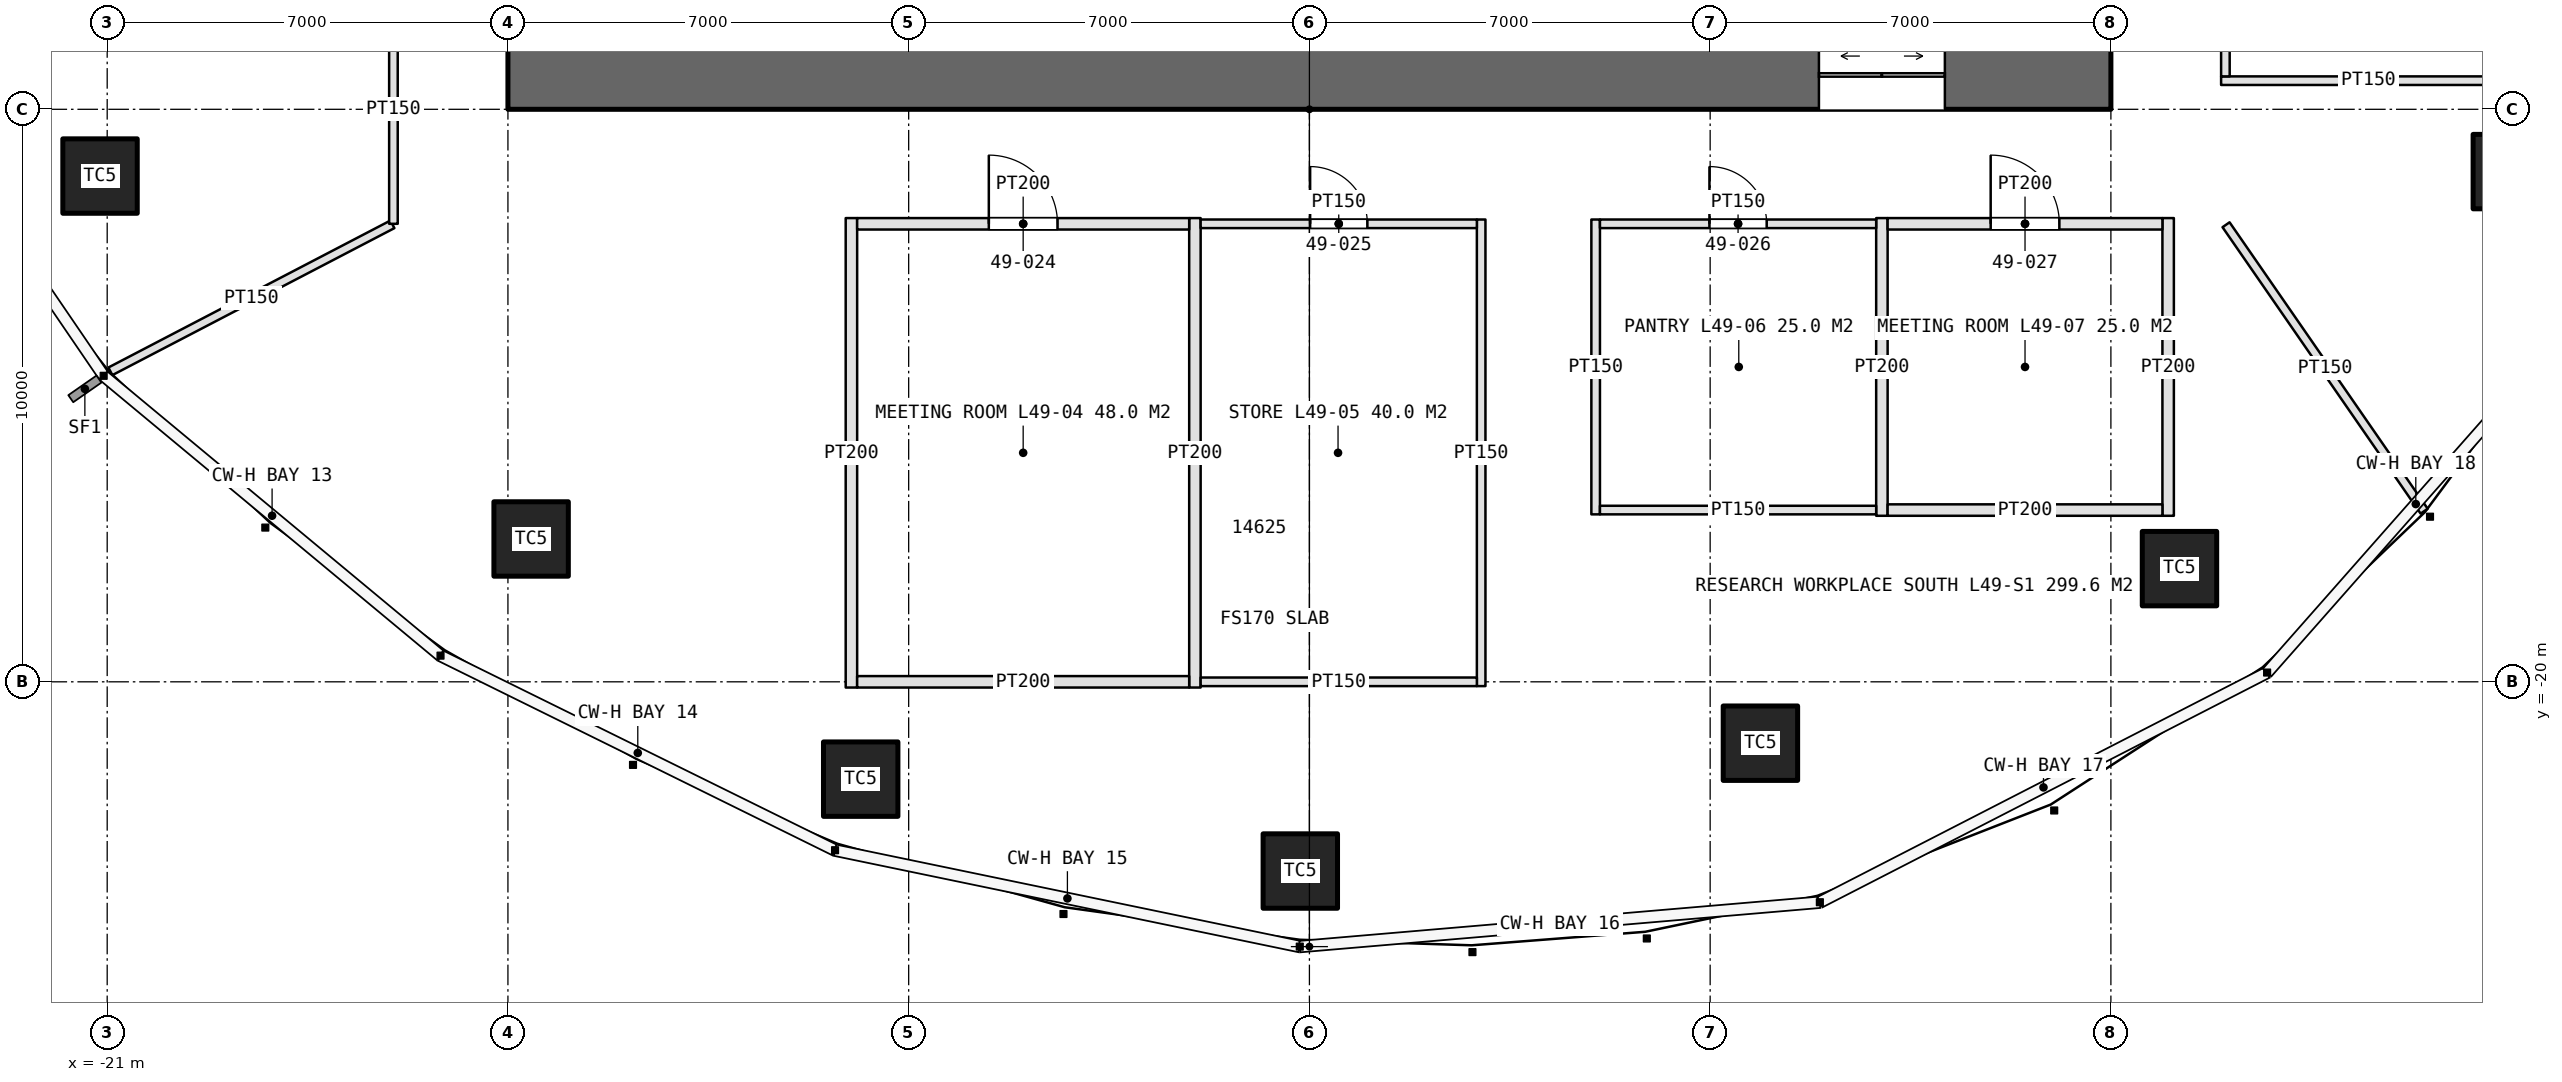
"""IFC4 building model, lengths in metres.
Left out: names, types, materials, properties, quantities, classifications, styles, units other than length and angle.
Written with IfcOpenShell. Run it as: python <this file> out.ifc"""

import sys

from ifc_helpers import new_model, si_unit, direction, frame, frame_2d, origin, origin_2d, place, context, subcontext, project, spatial, rectangle, extrude, element, fill, save


model = new_model("IFC4")
c1 = context("Model", 3, precision=1e-05, world=origin(), true_north=direction((0.0, 1.0)))
c2 = subcontext(c1, "Body", "Model", "MODEL_VIEW")
j1 = project(units=[si_unit("LENGTHUNIT", "METRE"), si_unit("PLANEANGLEUNIT", "RADIAN")], contexts=[c1])
p1 = place(None, origin())
s1 = spatial("IfcSite", under=j1, at=p1, CompositionType="ELEMENT")
p2 = place(p1, origin())
s2 = spatial("IfcBuilding", under=s1, at=p2, CompositionType="ELEMENT")
p3 = place(p2, frame((0.0, 0.0, 224.2)))
s3 = spatial("IfcBuildingStorey", under=s2, at=p3, CompositionType="ELEMENT", Elevation=224.2)
p4 = place(p3, frame((-14.0, -9.4, 0.0), z_axis=(0.0, 0.0, 1.0), x_axis=(1.0, 0.0, 0.0)))
e1 = element("IfcWall", 1, at=p4, inside=s3, PredefinedType="SHEAR", context=c2, shape_type="SweptSolid", body=[
    extrude(rectangle(XDim=28.0, YDim=1.2, at=frame_2d((14.0, 0.0))), origin(), (0.0, 0.0, 1.0), 4.2),
])
p5 = place(p4, frame((22.9, 0.0, 0.0)))
e2 = element("IfcOpeningElement", 2, at=p5, cuts=e1, PredefinedType="OPENING", context=c2, shape_type="SweptSolid", body=[
    extrude(rectangle(XDim=2.2, YDim=2.7, at=frame_2d((1.1, 1.35))), frame((0.0, 0.61, 0.0), z_axis=(0.0, -1.0, 0.0), x_axis=(1.0, 0.0, 0.0)), (0.0, 0.0, 1.0), 1.22),
])
for number, where, z_axis, x_axis in (
    (3, (-21.125, -11.166, 0.0), (0.0, 0.0, 1.0), (1.0, 0.0, 0.0)),
    (4, (-13.595, -17.505, 0.0), (0.0, 0.0, 1.0), (1.0, 0.0, 0.0)),
    (5, (-7.838, -21.7, 0.0), (0.0, 0.0, 1.0), (1.0, 0.0, 0.0)),
    (6, (-0.159, -23.305, 0.0), (0.0, 0.0, 1.0), (1.0, 0.0, 0.0)),
    (7, (7.878, -21.072, 0.0), (0.0, 0.0, 1.0), (1.0, 0.0, 0.0)),
    (8, (15.198, -18.023, 0.0), (0.0, 0.0, 1.0), (1.0, 0.0, 0.0)),
    (9, (20.977, -11.088, 0.0), (0.0, 0.0, 1.0), (1.0, 0.0, 0.0)),
):
    element("IfcColumn", number, at=place(p3, frame(where, z_axis=z_axis, x_axis=x_axis)), inside=s3, PredefinedType="COLUMN", context=c2, shape_type="SweptSolid", body=[
        extrude(rectangle(XDim=1.3, YDim=1.3, at=origin_2d()), origin(), (0.0, 0.0, 1.0), 4.2),
    ])
for number, where, z_axis, x_axis in (
    (10, (-8.0, -11.9, 0.0), (0.0, 0.0, 1.0), (0.0, -1.0, 0.0)),
    (11, (-2.0, -11.9, 0.0), (0.0, 0.0, 1.0), (0.0, -1.0, 0.0)),
):
    element("IfcWall", number, at=place(p3, frame(where, z_axis=z_axis, x_axis=x_axis)), inside=s3, PredefinedType="PARTITIONING", context=c2, shape_type="SweptSolid", body=[
        extrude(rectangle(XDim=8.2, YDim=0.2, at=frame_2d((4.1, 0.0))), origin(), (0.0, 0.0, 1.0), 3.0),
    ])
p6 = place(p3, frame((3.0, -11.925, 0.0), z_axis=(0.0, 0.0, 1.0), x_axis=(0.0, -1.0, 0.0)))
e12 = element("IfcWall", 12, at=p6, inside=s3, PredefinedType="PARTITIONING", context=c2, shape_type="SweptSolid", body=[
    extrude(rectangle(XDim=8.15, YDim=0.15, at=frame_2d((4.075, 0.0))), origin(), (0.0, 0.0, 1.0), 3.0),
])
p7 = place(p3, frame((-7.9, -12.0, 0.0), z_axis=(0.0, 0.0, 1.0), x_axis=(1.0, 0.0, 0.0)))
e13 = element("IfcWall", 13, at=p7, inside=s3, PredefinedType="PARTITIONING", context=c2, shape_type="SweptSolid", body=[
    extrude(rectangle(XDim=5.8, YDim=0.2, at=frame_2d((2.9, 0.0))), origin(), (0.0, 0.0, 1.0), 3.0),
])
p8 = place(p7, frame((2.3, 0.0, 0.0)))
e14 = element("IfcOpeningElement", 14, at=p8, cuts=e13, PredefinedType="OPENING", context=c2, shape_type="SweptSolid", body=[
    extrude(rectangle(XDim=1.2, YDim=2.4, at=frame_2d((0.6, 1.2))), frame((0.0, 0.11, 0.0), z_axis=(0.0, -1.0, 0.0), x_axis=(1.0, 0.0, 0.0)), (0.0, 0.0, 1.0), 0.22),
])
p9 = place(p3, frame((-7.9, -20.0, 0.0), z_axis=(0.0, 0.0, 1.0), x_axis=(1.0, 0.0, 0.0)))
e15 = element("IfcWall", 15, at=p9, inside=s3, PredefinedType="PARTITIONING", context=c2, shape_type="SweptSolid", body=[
    extrude(rectangle(XDim=5.8, YDim=0.2, at=frame_2d((2.9, 0.0))), origin(), (0.0, 0.0, 1.0), 3.0),
])
p10 = place(p3, frame((-1.9, -12.0, 0.0), z_axis=(0.0, 0.0, 1.0), x_axis=(1.0, 0.0, 0.0)))
e16 = element("IfcWall", 16, at=p10, inside=s3, PredefinedType="PARTITIONING", context=c2, shape_type="SweptSolid", body=[
    extrude(rectangle(XDim=4.825, YDim=0.15, at=frame_2d((2.413, 0.0))), origin(), (0.0, 0.0, 1.0), 3.0),
])
p11 = place(p10, frame((1.913, 0.0, 0.0)))
e17 = element("IfcOpeningElement", 17, at=p11, cuts=e16, PredefinedType="OPENING", context=c2, shape_type="SweptSolid", body=[
    extrude(rectangle(XDim=1.0, YDim=2.2, at=frame_2d((0.5, 1.1))), frame((0.0, 0.085, 0.0), z_axis=(0.0, -1.0, 0.0), x_axis=(1.0, 0.0, 0.0)), (0.0, 0.0, 1.0), 0.17),
])
p12 = place(p3, frame((-1.9, -20.0, 0.0), z_axis=(0.0, 0.0, 1.0), x_axis=(1.0, 0.0, 0.0)))
e18 = element("IfcWall", 18, at=p12, inside=s3, PredefinedType="PARTITIONING", context=c2, shape_type="SweptSolid", body=[
    extrude(rectangle(XDim=4.825, YDim=0.15, at=frame_2d((2.413, 0.0))), origin(), (0.0, 0.0, 1.0), 3.0),
])
p13 = place(p3, frame((5.0, -11.925, 0.0), z_axis=(0.0, 0.0, 1.0), x_axis=(0.0, -1.0, 0.0)))
e19 = element("IfcWall", 19, at=p13, inside=s3, PredefinedType="PARTITIONING", context=c2, shape_type="SweptSolid", body=[
    extrude(rectangle(XDim=5.15, YDim=0.15, at=frame_2d((2.575, 0.0))), origin(), (0.0, 0.0, 1.0), 3.0),
])
for number, where, z_axis, x_axis in (
    (20, (10.0, -11.9, 0.0), (0.0, 0.0, 1.0), (0.0, -1.0, 0.0)),
    (21, (15.0, -11.9, 0.0), (0.0, 0.0, 1.0), (0.0, -1.0, 0.0)),
):
    element("IfcWall", number, at=place(p3, frame(where, z_axis=z_axis, x_axis=x_axis)), inside=s3, PredefinedType="PARTITIONING", context=c2, shape_type="SweptSolid", body=[
        extrude(rectangle(XDim=5.2, YDim=0.2, at=frame_2d((2.6, 0.0))), origin(), (0.0, 0.0, 1.0), 3.0),
    ])
p14 = place(p3, frame((5.075, -12.0, 0.0), z_axis=(0.0, 0.0, 1.0), x_axis=(1.0, 0.0, 0.0)))
e22 = element("IfcWall", 22, at=p14, inside=s3, PredefinedType="PARTITIONING", context=c2, shape_type="SweptSolid", body=[
    extrude(rectangle(XDim=4.825, YDim=0.15, at=frame_2d((2.413, 0.0))), origin(), (0.0, 0.0, 1.0), 3.0),
])
p15 = place(p14, frame((1.913, 0.0, 0.0)))
e23 = element("IfcOpeningElement", 23, at=p15, cuts=e22, PredefinedType="OPENING", context=c2, shape_type="SweptSolid", body=[
    extrude(rectangle(XDim=1.0, YDim=2.2, at=frame_2d((0.5, 1.1))), frame((0.0, 0.085, 0.0), z_axis=(0.0, -1.0, 0.0), x_axis=(1.0, 0.0, 0.0)), (0.0, 0.0, 1.0), 0.17),
])
p16 = place(p3, frame((5.075, -17.0, 0.0), z_axis=(0.0, 0.0, 1.0), x_axis=(1.0, 0.0, 0.0)))
e24 = element("IfcWall", 24, at=p16, inside=s3, PredefinedType="PARTITIONING", context=c2, shape_type="SweptSolid", body=[
    extrude(rectangle(XDim=4.825, YDim=0.15, at=frame_2d((2.413, 0.0))), origin(), (0.0, 0.0, 1.0), 3.0),
])
p17 = place(p3, frame((10.1, -12.0, 0.0), z_axis=(0.0, 0.0, 1.0), x_axis=(1.0, 0.0, 0.0)))
e25 = element("IfcWall", 25, at=p17, inside=s3, PredefinedType="PARTITIONING", context=c2, shape_type="SweptSolid", body=[
    extrude(rectangle(XDim=4.8, YDim=0.2, at=frame_2d((2.4, 0.0))), origin(), (0.0, 0.0, 1.0), 3.0),
])
p18 = place(p17, frame((1.8, 0.0, 0.0)))
e26 = element("IfcOpeningElement", 26, at=p18, cuts=e25, PredefinedType="OPENING", context=c2, shape_type="SweptSolid", body=[
    extrude(rectangle(XDim=1.2, YDim=2.4, at=frame_2d((0.6, 1.2))), frame((0.0, 0.11, 0.0), z_axis=(0.0, -1.0, 0.0), x_axis=(1.0, 0.0, 0.0)), (0.0, 0.0, 1.0), 0.22),
])
p19 = place(p3, frame((10.1, -17.0, 0.0), z_axis=(0.0, 0.0, 1.0), x_axis=(1.0, 0.0, 0.0)))
e27 = element("IfcWall", 27, at=p19, inside=s3, PredefinedType="PARTITIONING", context=c2, shape_type="SweptSolid", body=[
    extrude(rectangle(XDim=4.8, YDim=0.2, at=frame_2d((2.4, 0.0))), origin(), (0.0, 0.0, 1.0), 3.0),
])
p20 = place(p3, frame((15.925, -9.5, 0.0), z_axis=(0.0, 0.0, 1.0), x_axis=(1.0, 0.0, 0.0)))
e28 = element("IfcWall", 28, at=p20, inside=s3, PredefinedType="PARTITIONING", context=c2, shape_type="SweptSolid", body=[
    extrude(rectangle(XDim=5.15, YDim=0.15, at=frame_2d((2.575, 0.0))), origin(), (0.0, 0.0, 1.0), 3.0),
])
p21 = place(p3, frame((16.0, -9.425, 0.0), z_axis=(0.0, 0.0, 1.0), x_axis=(0.0, 1.0, 0.0)))
e29 = element("IfcWall", 29, at=p21, inside=s3, PredefinedType="PARTITIONING", context=c2, shape_type="SweptSolid", body=[
    extrude(rectangle(XDim=4.35, YDim=0.15, at=frame_2d((2.175, 0.0))), origin(), (0.0, 0.0, 1.0), 3.0),
])
p22 = place(p21, frame((1.625, 0.0, 0.0)))
e30 = element("IfcOpeningElement", 30, at=p22, cuts=e29, PredefinedType="OPENING", context=c2, shape_type="SweptSolid", body=[
    extrude(rectangle(XDim=1.1, YDim=2.3, at=frame_2d((0.55, 1.15))), frame((0.0, 0.085, 0.0), z_axis=(0.0, -1.0, 0.0), x_axis=(1.0, 0.0, 0.0)), (0.0, 0.0, 1.0), 0.17),
])
p23 = place(p3, frame((-16.018, -12.009, 0.0), z_axis=(0.0, 0.0, 1.0), x_axis=(-0.886831549241, -0.462092851351, 0.0)))
e31 = element("IfcWall", 31, at=p23, inside=s3, PredefinedType="PARTITIONING", context=c2, shape_type="SweptSolid", body=[
    extrude(rectangle(XDim=5.555, YDim=0.15, at=frame_2d((2.778, 0.0))), origin(), (0.0, 0.0, 1.0), 3.0),
])
p24 = place(p3, frame((16.011, -12.016, 0.0), z_axis=(0.0, 0.0, 1.0), x_axis=(0.568863489071, -0.822431961199, 0.0)))
e32 = element("IfcWall", 32, at=p24, inside=s3, PredefinedType="PARTITIONING", context=c2, shape_type="SweptSolid", body=[
    extrude(rectangle(XDim=6.083, YDim=0.15, at=frame_2d((3.042, 0.0))), origin(), (0.0, 0.0, 1.0), 3.0),
])
p25 = place(p3, frame((-16.0, -8.0, 0.0), z_axis=(0.0, 0.0, 1.0), x_axis=(0.0, -1.0, 0.0)))
e33 = element("IfcWall", 33, at=p25, inside=s3, PredefinedType="PARTITIONING", context=c2, shape_type="SweptSolid", body=[
    extrude(rectangle(XDim=4.0, YDim=0.15, at=frame_2d((2.0, 0.0))), origin(), (0.0, 0.0, 1.0), 3.0),
])
p26 = place(p5, origin())
e34 = element("IfcDoor", 34, at=p26, inside=s3, OperationType="DOUBLE_DOOR_SLIDING", PredefinedType="DOOR", context=c2, shape_type="SweptSolid", body=[
    extrude(rectangle(XDim=2.2, YDim=2.7, at=frame_2d((1.1, 1.35))), frame((0.0, 0.025, 0.0), z_axis=(0.0, -1.0, 0.0), x_axis=(1.0, 0.0, 0.0)), (0.0, 0.0, 1.0), 0.05),
])
fill(e2, e34)
p27 = place(p8, origin())
e35 = element("IfcDoor", 35, at=p27, inside=s3, OperationType="SINGLE_SWING_LEFT", PredefinedType="DOOR", context=c2, shape_type="SweptSolid", body=[
    extrude(rectangle(XDim=1.2, YDim=2.4, at=frame_2d((0.6, 1.2))), frame((0.0, 0.025, 0.0), z_axis=(0.0, -1.0, 0.0), x_axis=(1.0, 0.0, 0.0)), (0.0, 0.0, 1.0), 0.05),
])
fill(e14, e35)
p28 = place(p11, origin())
e36 = element("IfcDoor", 36, at=p28, inside=s3, OperationType="SINGLE_SWING_LEFT", PredefinedType="DOOR", context=c2, shape_type="SweptSolid", body=[
    extrude(rectangle(XDim=1.0, YDim=2.2, at=frame_2d((0.5, 1.1))), frame((0.0, 0.025, 0.0), z_axis=(0.0, -1.0, 0.0), x_axis=(1.0, 0.0, 0.0)), (0.0, 0.0, 1.0), 0.05),
])
fill(e17, e36)
p29 = place(p15, origin())
e37 = element("IfcDoor", 37, at=p29, inside=s3, OperationType="SINGLE_SWING_LEFT", PredefinedType="DOOR", context=c2, shape_type="SweptSolid", body=[
    extrude(rectangle(XDim=1.0, YDim=2.2, at=frame_2d((0.5, 1.1))), frame((0.0, 0.025, 0.0), z_axis=(0.0, -1.0, 0.0), x_axis=(1.0, 0.0, 0.0)), (0.0, 0.0, 1.0), 0.05),
])
fill(e23, e37)
p30 = place(p18, origin())
e38 = element("IfcDoor", 38, at=p30, inside=s3, OperationType="SINGLE_SWING_LEFT", PredefinedType="DOOR", context=c2, shape_type="SweptSolid", body=[
    extrude(rectangle(XDim=1.2, YDim=2.4, at=frame_2d((0.6, 1.2))), frame((0.0, 0.025, 0.0), z_axis=(0.0, -1.0, 0.0), x_axis=(1.0, 0.0, 0.0)), (0.0, 0.0, 1.0), 0.05),
])
fill(e26, e38)
save(model, sys.argv[1])
